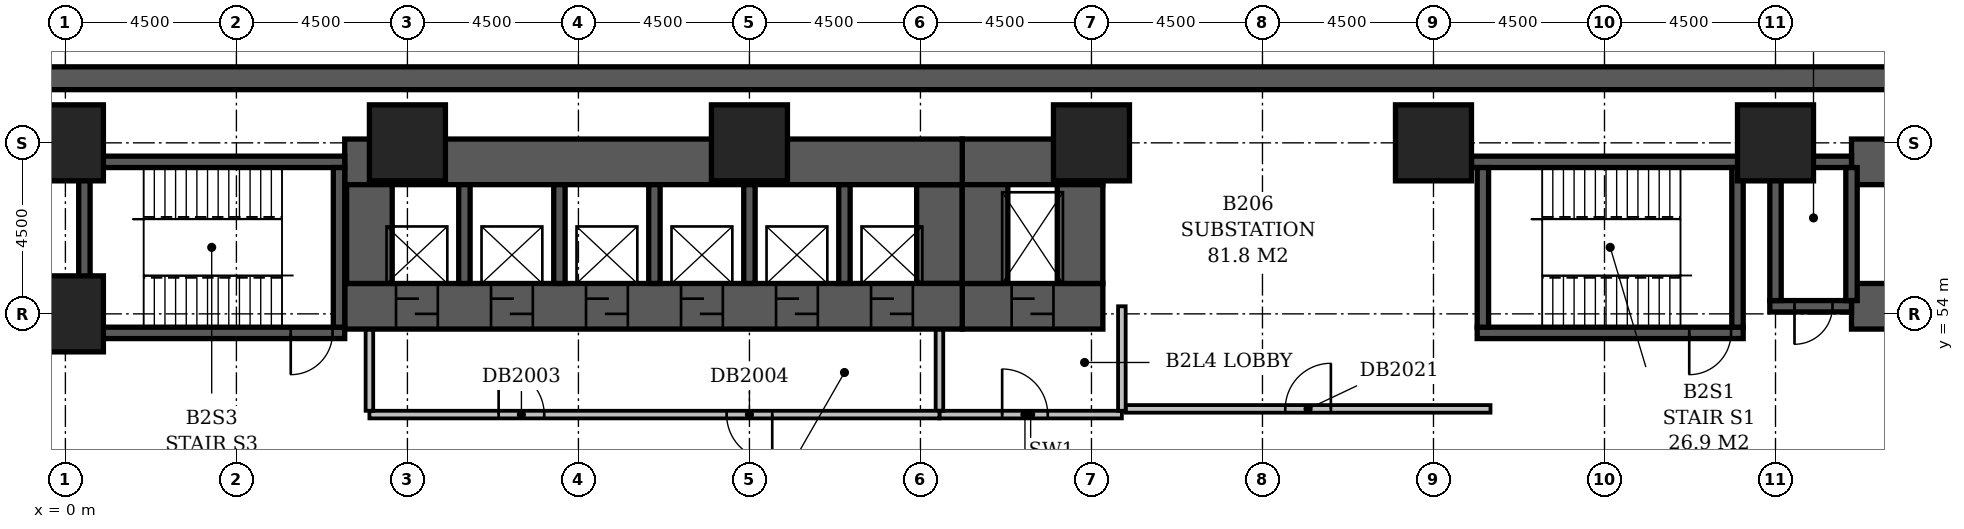
"""IFC4 building model, lengths in metres.
Left out: names, types, materials, properties, quantities, classifications, styles, units other than length and angle.
Written with IfcOpenShell. Run it as: python <this file> out.ifc"""

import sys

from ifc_helpers import new_model, si_unit, direction, frame, frame_2d, origin, origin_2d, place, context, subcontext, project, spatial, rectangle, extrude, element, fill, save


model = new_model("IFC4")
c1 = context("Model", 3, precision=1e-05, world=origin(), true_north=direction((0.0, 1.0)))
c2 = subcontext(c1, "Body", "Model", "MODEL_VIEW")
j1 = project(units=[si_unit("LENGTHUNIT", "METRE"), si_unit("PLANEANGLEUNIT", "RADIAN")], contexts=[c1])
p1 = place(None, origin())
s1 = spatial("IfcSite", under=j1, at=p1, CompositionType="ELEMENT")
p2 = place(p1, origin())
s2 = spatial("IfcBuilding", under=s1, at=p2, CompositionType="ELEMENT")
p3 = place(p2, frame((0.0, 0.0, -9.0)))
s3 = spatial("IfcBuildingStorey", under=s2, at=p3, CompositionType="ELEMENT", Elevation=-9.0)
for number, where, z_axis, x_axis in (
    (1, (0.0, 54.0, 0.0), (0.0, 0.0, 1.0), (1.0, 0.0, 0.0)),
    (2, (0.0, 58.5, 0.0), (0.0, 0.0, 1.0), (1.0, 0.0, 0.0)),
    (3, (9.0, 58.5, 0.0), (0.0, 0.0, 1.0), (1.0, 0.0, 0.0)),
    (4, (18.0, 58.5, 0.0), (0.0, 0.0, 1.0), (1.0, 0.0, 0.0)),
    (5, (27.0, 58.5, 0.0), (0.0, 0.0, 1.0), (1.0, 0.0, 0.0)),
    (6, (36.0, 58.5, 0.0), (0.0, 0.0, 1.0), (1.0, 0.0, 0.0)),
    (7, (45.0, 58.5, 0.0), (0.0, 0.0, 1.0), (1.0, 0.0, 0.0)),
):
    element("IfcColumn", number, at=place(p3, frame(where, z_axis=z_axis, x_axis=x_axis)), inside=s3, PredefinedType="COLUMN", context=c2, shape_type="SweptSolid", body=[
        extrude(rectangle(XDim=2.0, YDim=2.0, at=origin_2d()), origin(), (0.0, 0.0, 1.0), 4.1),
    ])
p4 = place(p3, frame((-2.0, 60.2, 0.0), z_axis=(0.0, 0.0, 1.0), x_axis=(1.0, 0.0, 0.0)))
e8 = element("IfcWall", 8, at=p4, inside=s3, PredefinedType="SOLIDWALL", context=c2, shape_type="SweptSolid", body=[
    extrude(rectangle(XDim=71.5, YDim=0.6, at=frame_2d((35.75, 0.0))), origin(), (0.0, 0.0, 1.0), 4.1),
])
p5 = place(p3, frame((0.35, 53.5, 0.0), z_axis=(0.0, 0.0, 1.0), x_axis=(1.0, 0.0, 0.0)))
e9 = element("IfcWall", 9, at=p5, inside=s3, PredefinedType="SHEAR", context=c2, shape_type="SweptSolid", body=[
    extrude(rectangle(XDim=7.0, YDim=0.3, at=frame_2d((3.5, 0.0))), origin(), (0.0, 0.0, 1.0), 4.1),
])
p6 = place(p5, frame((5.58, 0.0, 0.0)))
e10 = element("IfcOpeningElement", 10, at=p6, cuts=e9, PredefinedType="OPENING", context=c2, shape_type="SweptSolid", body=[
    extrude(rectangle(XDim=1.1, YDim=2.1, at=frame_2d((0.55, 1.05))), frame((0.0, 0.162, 0.0), z_axis=(0.0, -1.0, 0.0), x_axis=(1.0, 0.0, 0.0)), (0.0, 0.0, 1.0), 0.324),
])
p7 = place(p3, frame((37.15, 53.5, 0.0), z_axis=(0.0, 0.0, 1.0), x_axis=(1.0, 0.0, 0.0)))
e11 = element("IfcWall", 11, at=p7, inside=s3, PredefinedType="SHEAR", context=c2, shape_type="SweptSolid", body=[
    extrude(rectangle(XDim=7.0, YDim=0.3, at=frame_2d((3.5, 0.0))), origin(), (0.0, 0.0, 1.0), 4.1),
])
p8 = place(p7, frame((5.58, 0.0, 0.0)))
e12 = element("IfcOpeningElement", 12, at=p8, cuts=e11, PredefinedType="OPENING", context=c2, shape_type="SweptSolid", body=[
    extrude(rectangle(XDim=1.1, YDim=2.1, at=frame_2d((0.55, 1.05))), frame((0.0, 0.162, 0.0), z_axis=(0.0, -1.0, 0.0), x_axis=(1.0, 0.0, 0.0)), (0.0, 0.0, 1.0), 0.324),
])
p9 = place(p3, frame((7.35, 54.2, 0.0), z_axis=(0.0, 0.0, 1.0), x_axis=(1.0, 0.0, 0.0)))
e13 = element("IfcWall", 13, at=p9, inside=s3, PredefinedType="SHEAR", context=c2, shape_type="SweptSolid", body=[
    extrude(rectangle(XDim=16.25, YDim=1.2, at=frame_2d((8.125, 0.0))), origin(), (0.0, 0.0, 1.0), 4.1),
])
p10 = place(p9, frame((1.35, 0.0, 0.0)))
e14 = element("IfcOpeningElement", 14, at=p10, cuts=e13, PredefinedType="OPENING", context=c2, shape_type="SweptSolid", body=[
    extrude(rectangle(XDim=1.1, YDim=2.1, at=frame_2d((0.55, 1.05))), frame((0.0, 0.612, 0.0), z_axis=(0.0, -1.0, 0.0), x_axis=(1.0, 0.0, 0.0)), (0.0, 0.0, 1.0), 1.224),
])
p11 = place(p9, frame((3.85, 0.0, 0.0)))
e15 = element("IfcOpeningElement", 15, at=p11, cuts=e13, PredefinedType="OPENING", context=c2, shape_type="SweptSolid", body=[
    extrude(rectangle(XDim=1.1, YDim=2.1, at=frame_2d((0.55, 1.05))), frame((0.0, 0.612, 0.0), z_axis=(0.0, -1.0, 0.0), x_axis=(1.0, 0.0, 0.0)), (0.0, 0.0, 1.0), 1.224),
])
p12 = place(p9, frame((6.35, 0.0, 0.0)))
e16 = element("IfcOpeningElement", 16, at=p12, cuts=e13, PredefinedType="OPENING", context=c2, shape_type="SweptSolid", body=[
    extrude(rectangle(XDim=1.1, YDim=2.1, at=frame_2d((0.55, 1.05))), frame((0.0, 0.612, 0.0), z_axis=(0.0, -1.0, 0.0), x_axis=(1.0, 0.0, 0.0)), (0.0, 0.0, 1.0), 1.224),
])
p13 = place(p9, frame((8.85, 0.0, 0.0)))
e17 = element("IfcOpeningElement", 17, at=p13, cuts=e13, PredefinedType="OPENING", context=c2, shape_type="SweptSolid", body=[
    extrude(rectangle(XDim=1.1, YDim=2.1, at=frame_2d((0.55, 1.05))), frame((0.0, 0.612, 0.0), z_axis=(0.0, -1.0, 0.0), x_axis=(1.0, 0.0, 0.0)), (0.0, 0.0, 1.0), 1.224),
])
p14 = place(p9, frame((11.35, 0.0, 0.0)))
e18 = element("IfcOpeningElement", 18, at=p14, cuts=e13, PredefinedType="OPENING", context=c2, shape_type="SweptSolid", body=[
    extrude(rectangle(XDim=1.1, YDim=2.1, at=frame_2d((0.55, 1.05))), frame((0.0, 0.612, 0.0), z_axis=(0.0, -1.0, 0.0), x_axis=(1.0, 0.0, 0.0)), (0.0, 0.0, 1.0), 1.224),
])
p15 = place(p9, frame((13.85, 0.0, 0.0)))
e19 = element("IfcOpeningElement", 19, at=p15, cuts=e13, PredefinedType="OPENING", context=c2, shape_type="SweptSolid", body=[
    extrude(rectangle(XDim=1.1, YDim=2.1, at=frame_2d((0.55, 1.05))), frame((0.0, 0.612, 0.0), z_axis=(0.0, -1.0, 0.0), x_axis=(1.0, 0.0, 0.0)), (0.0, 0.0, 1.0), 1.224),
])
p16 = place(p3, frame((23.6, 54.2, 0.0), z_axis=(0.0, 0.0, 1.0), x_axis=(1.0, 0.0, 0.0)))
e20 = element("IfcWall", 20, at=p16, inside=s3, PredefinedType="SHEAR", context=c2, shape_type="SweptSolid", body=[
    extrude(rectangle(XDim=3.7, YDim=1.2, at=frame_2d((1.85, 0.0))), origin(), (0.0, 0.0, 1.0), 4.1),
])
p17 = place(p16, frame((1.3, 0.0, 0.0)))
e21 = element("IfcOpeningElement", 21, at=p17, cuts=e20, PredefinedType="OPENING", context=c2, shape_type="SweptSolid", body=[
    extrude(rectangle(XDim=1.1, YDim=2.1, at=frame_2d((0.55, 1.05))), frame((0.0, 0.612, 0.0), z_axis=(0.0, -1.0, 0.0), x_axis=(1.0, 0.0, 0.0)), (0.0, 0.0, 1.0), 1.224),
])
p18 = place(p3, frame((44.85, 54.2, 0.0), z_axis=(0.0, 0.0, 1.0), x_axis=(1.0, 0.0, 0.0)))
e22 = element("IfcWall", 22, at=p18, inside=s3, PredefinedType="SHEAR", context=c2, shape_type="SweptSolid", body=[
    extrude(rectangle(XDim=2.15, YDim=0.3, at=frame_2d((1.075, 0.0))), origin(), (0.0, 0.0, 1.0), 4.1),
])
p19 = place(p18, frame((0.65, 0.0, 0.0)))
e23 = element("IfcOpeningElement", 23, at=p19, cuts=e22, PredefinedType="OPENING", context=c2, shape_type="SweptSolid", body=[
    extrude(rectangle(XDim=1.0, YDim=2.1, at=frame_2d((0.5, 1.05))), frame((0.0, 0.162, 0.0), z_axis=(0.0, -1.0, 0.0), x_axis=(1.0, 0.0, 0.0)), (0.0, 0.0, 1.0), 0.324),
])
p20 = place(p3, frame((47.0, 54.2, 0.0), z_axis=(0.0, 0.0, 1.0), x_axis=(1.0, 0.0, 0.0)))
e24 = element("IfcWall", 24, at=p20, inside=s3, PredefinedType="SHEAR", context=c2, shape_type="SweptSolid", body=[
    extrude(rectangle(XDim=5.6, YDim=1.2, at=frame_2d((2.8, 0.0))), origin(), (0.0, 0.0, 1.0), 4.1),
])
p21 = place(p3, frame((0.35, 58.0, 0.0), z_axis=(0.0, 0.0, 1.0), x_axis=(1.0, 0.0, 0.0)))
e25 = element("IfcWall", 25, at=p21, inside=s3, PredefinedType="SHEAR", context=c2, shape_type="SweptSolid", body=[
    extrude(rectangle(XDim=7.0, YDim=0.3, at=frame_2d((3.5, 0.0))), origin(), (0.0, 0.0, 1.0), 4.1),
])
p22 = place(p3, frame((7.35, 58.0, 0.0), z_axis=(0.0, 0.0, 1.0), x_axis=(1.0, 0.0, 0.0)))
e26 = element("IfcWall", 26, at=p22, inside=s3, PredefinedType="SHEAR", context=c2, shape_type="SweptSolid", body=[
    extrude(rectangle(XDim=16.25, YDim=1.2, at=frame_2d((8.125, 0.0))), origin(), (0.0, 0.0, 1.0), 4.1),
])
p23 = place(p3, frame((23.6, 58.0, 0.0), z_axis=(0.0, 0.0, 1.0), x_axis=(1.0, 0.0, 0.0)))
e27 = element("IfcWall", 27, at=p23, inside=s3, PredefinedType="SHEAR", context=c2, shape_type="SweptSolid", body=[
    extrude(rectangle(XDim=3.7, YDim=1.2, at=frame_2d((1.85, 0.0))), origin(), (0.0, 0.0, 1.0), 4.1),
])
p24 = place(p3, frame((37.0, 58.0, 0.0), z_axis=(0.0, 0.0, 1.0), x_axis=(1.0, 0.0, 0.0)))
e28 = element("IfcWall", 28, at=p24, inside=s3, PredefinedType="SHEAR", context=c2, shape_type="SweptSolid", body=[
    extrude(rectangle(XDim=7.15, YDim=0.3, at=frame_2d((3.575, 0.0))), origin(), (0.0, 0.0, 1.0), 4.1),
])
p25 = place(p3, frame((44.85, 58.0, 0.0), z_axis=(0.0, 0.0, 1.0), x_axis=(1.0, 0.0, 0.0)))
e29 = element("IfcWall", 29, at=p25, inside=s3, PredefinedType="SHEAR", context=c2, shape_type="SweptSolid", body=[
    extrude(rectangle(XDim=2.15, YDim=0.3, at=frame_2d((1.075, 0.0))), origin(), (0.0, 0.0, 1.0), 4.1),
])
p26 = place(p3, frame((47.0, 58.0, 0.0), z_axis=(0.0, 0.0, 1.0), x_axis=(1.0, 0.0, 0.0)))
e30 = element("IfcWall", 30, at=p26, inside=s3, PredefinedType="SHEAR", context=c2, shape_type="SweptSolid", body=[
    extrude(rectangle(XDim=6.0, YDim=1.2, at=frame_2d((3.0, 0.0))), origin(), (0.0, 0.0, 1.0), 4.1),
])
for number, where, z_axis, x_axis in (
    (31, (0.5, 53.65, 0.0), (0.0, 0.0, 1.0), (0.0, 1.0, 0.0)),
    (32, (7.2, 53.65, 0.0), (0.0, 0.0, 1.0), (0.0, 1.0, 0.0)),
):
    element("IfcWall", number, at=place(p3, frame(where, z_axis=z_axis, x_axis=x_axis)), inside=s3, PredefinedType="SHEAR", context=c2, shape_type="SweptSolid", body=[
        extrude(rectangle(XDim=4.2, YDim=0.3, at=frame_2d((2.1, 0.0))), origin(), (0.0, 0.0, 1.0), 4.1),
    ])
p27 = place(p3, frame((8.0, 54.8, 0.0), z_axis=(0.0, 0.0, 1.0), x_axis=(0.0, 1.0, 0.0)))
e33 = element("IfcWall", 33, at=p27, inside=s3, PredefinedType="SHEAR", context=c2, shape_type="SweptSolid", body=[
    extrude(rectangle(XDim=2.6, YDim=1.2, at=frame_2d((1.3, 0.0))), origin(), (0.0, 0.0, 1.0), 4.1),
])
for number, where, z_axis, x_axis in (
    (34, (10.5, 54.8, 0.0), (0.0, 0.0, 1.0), (0.0, 1.0, 0.0)),
    (35, (13.0, 54.8, 0.0), (0.0, 0.0, 1.0), (0.0, 1.0, 0.0)),
    (36, (15.5, 54.8, 0.0), (0.0, 0.0, 1.0), (0.0, 1.0, 0.0)),
    (37, (18.0, 54.8, 0.0), (0.0, 0.0, 1.0), (0.0, 1.0, 0.0)),
    (38, (20.5, 54.8, 0.0), (0.0, 0.0, 1.0), (0.0, 1.0, 0.0)),
):
    element("IfcWall", number, at=place(p3, frame(where, z_axis=z_axis, x_axis=x_axis)), inside=s3, PredefinedType="SHEAR", context=c2, shape_type="SweptSolid", body=[
        extrude(rectangle(XDim=2.6, YDim=0.3, at=frame_2d((1.3, 0.0))), origin(), (0.0, 0.0, 1.0), 4.1),
    ])
for number, where, z_axis, x_axis in (
    (39, (23.0, 54.8, 0.0), (0.0, 0.0, 1.0), (0.0, 1.0, 0.0)),
    (40, (24.2, 54.8, 0.0), (0.0, 0.0, 1.0), (0.0, 1.0, 0.0)),
    (41, (26.7, 54.8, 0.0), (0.0, 0.0, 1.0), (0.0, 1.0, 0.0)),
):
    element("IfcWall", number, at=place(p3, frame(where, z_axis=z_axis, x_axis=x_axis)), inside=s3, PredefinedType="SHEAR", context=c2, shape_type="SweptSolid", body=[
        extrude(rectangle(XDim=2.6, YDim=1.2, at=frame_2d((1.3, 0.0))), origin(), (0.0, 0.0, 1.0), 4.1),
    ])
for number, where, z_axis, x_axis in (
    (42, (37.3, 53.65, 0.0), (0.0, 0.0, 1.0), (0.0, 1.0, 0.0)),
    (43, (44.0, 53.65, 0.0), (0.0, 0.0, 1.0), (0.0, 1.0, 0.0)),
):
    element("IfcWall", number, at=place(p3, frame(where, z_axis=z_axis, x_axis=x_axis)), inside=s3, PredefinedType="SHEAR", context=c2, shape_type="SweptSolid", body=[
        extrude(rectangle(XDim=4.2, YDim=0.3, at=frame_2d((2.1, 0.0))), origin(), (0.0, 0.0, 1.0), 4.1),
    ])
for number, where, z_axis, x_axis in (
    (44, (45.0, 54.35, 0.0), (0.0, 0.0, 1.0), (0.0, 1.0, 0.0)),
    (45, (47.0, 54.35, 0.0), (0.0, 0.0, 1.0), (0.0, 1.0, 0.0)),
):
    element("IfcWall", number, at=place(p3, frame(where, z_axis=z_axis, x_axis=x_axis)), inside=s3, PredefinedType="SHEAR", context=c2, shape_type="SweptSolid", body=[
        extrude(rectangle(XDim=3.5, YDim=0.3, at=frame_2d((1.75, 0.0))), origin(), (0.0, 0.0, 1.0), 4.1),
    ])
p28 = place(p3, frame((8.0, 51.35, 0.0), z_axis=(0.0, 0.0, 1.0), x_axis=(1.0, 0.0, 0.0)))
e46 = element("IfcWall", 46, at=p28, inside=s3, PredefinedType="PARTITIONING", context=c2, shape_type="SweptSolid", body=[
    extrude(rectangle(XDim=15.0, YDim=0.2, at=frame_2d((7.5, 0.0))), origin(), (0.0, 0.0, 1.0), 4.1),
])
p29 = place(p28, frame((3.4, 0.0, 0.0)))
e47 = element("IfcOpeningElement", 47, at=p29, cuts=e46, PredefinedType="OPENING", context=c2, shape_type="SweptSolid", body=[
    extrude(rectangle(XDim=1.2, YDim=2.1, at=frame_2d((0.6, 1.05))), frame((0.0, 0.112, 0.0), z_axis=(0.0, -1.0, 0.0), x_axis=(1.0, 0.0, 0.0)), (0.0, 0.0, 1.0), 0.224),
])
p30 = place(p28, frame((9.4, 0.0, 0.0)))
e48 = element("IfcOpeningElement", 48, at=p30, cuts=e46, PredefinedType="OPENING", context=c2, shape_type="SweptSolid", body=[
    extrude(rectangle(XDim=1.2, YDim=2.1, at=frame_2d((0.6, 1.05))), frame((0.0, 0.112, 0.0), z_axis=(0.0, -1.0, 0.0), x_axis=(1.0, 0.0, 0.0)), (0.0, 0.0, 1.0), 0.224),
])
for number, where, z_axis, x_axis in (
    (49, (23.0, 51.45, 0.0), (0.0, 0.0, 1.0), (0.0, 1.0, 0.0)),
    (50, (8.0, 51.45, 0.0), (0.0, 0.0, 1.0), (0.0, 1.0, 0.0)),
):
    element("IfcWall", number, at=place(p3, frame(where, z_axis=z_axis, x_axis=x_axis)), inside=s3, PredefinedType="PARTITIONING", context=c2, shape_type="SweptSolid", body=[
        extrude(rectangle(XDim=2.13, YDim=0.2, at=frame_2d((1.065, 0.0))), origin(), (0.0, 0.0, 1.0), 4.1),
    ])
p31 = place(p3, frame((23.0, 51.35, 0.0), z_axis=(0.0, 0.0, 1.0), x_axis=(1.0, 0.0, 0.0)))
e51 = element("IfcWall", 51, at=p31, inside=s3, PredefinedType="PARTITIONING", context=c2, shape_type="SweptSolid", body=[
    extrude(rectangle(XDim=4.8, YDim=0.2, at=frame_2d((2.4, 0.0))), origin(), (0.0, 0.0, 1.0), 4.1),
])
p32 = place(p31, frame((1.65, 0.0, 0.0)))
e52 = element("IfcOpeningElement", 52, at=p32, cuts=e51, PredefinedType="OPENING", context=c2, shape_type="SweptSolid", body=[
    extrude(rectangle(XDim=1.2, YDim=2.1, at=frame_2d((0.6, 1.05))), frame((0.0, 0.112, 0.0), z_axis=(0.0, -1.0, 0.0), x_axis=(1.0, 0.0, 0.0)), (0.0, 0.0, 1.0), 0.224),
])
p33 = place(p3, frame((27.8, 51.45, 0.0), z_axis=(0.0, 0.0, 1.0), x_axis=(0.0, 1.0, 0.0)))
e53 = element("IfcWall", 53, at=p33, inside=s3, PredefinedType="PARTITIONING", context=c2, shape_type="SweptSolid", body=[
    extrude(rectangle(XDim=2.75, YDim=0.2, at=frame_2d((1.375, 0.0))), origin(), (0.0, 0.0, 1.0), 4.1),
])
p34 = place(p3, frame((37.5, 51.5, 0.0), z_axis=(0.0, 0.0, 1.0), x_axis=(-1.0, 0.0, 0.0)))
e54 = element("IfcWall", 54, at=p34, inside=s3, PredefinedType="PARTITIONING", context=c2, shape_type="SweptSolid", body=[
    extrude(rectangle(XDim=9.6, YDim=0.2, at=frame_2d((4.8, 0.0))), origin(), (0.0, 0.0, 1.0), 4.1),
])
p35 = place(p34, frame((4.2, 0.0, 0.0)))
e55 = element("IfcOpeningElement", 55, at=p35, cuts=e54, PredefinedType="OPENING", context=c2, shape_type="SweptSolid", body=[
    extrude(rectangle(XDim=1.2, YDim=2.1, at=frame_2d((0.6, 1.05))), frame((0.0, 0.112, 0.0), z_axis=(0.0, -1.0, 0.0), x_axis=(1.0, 0.0, 0.0)), (0.0, 0.0, 1.0), 0.224),
])
p36 = place(p32, origin())
e56 = element("IfcDoor", 56, at=p36, inside=s3, OperationType="SINGLE_SWING_LEFT", PredefinedType="DOOR", context=c2, shape_type="SweptSolid", body=[
    extrude(rectangle(XDim=1.2, YDim=2.1, at=frame_2d((0.6, 1.05))), frame((0.0, 0.025, 0.0), z_axis=(0.0, -1.0, 0.0), x_axis=(1.0, 0.0, 0.0)), (0.0, 0.0, 1.0), 0.05),
])
fill(e52, e56)
p37 = place(p17, origin())
e57 = element("IfcDoor", 57, at=p37, inside=s3, OperationType="SLIDING_TO_LEFT", PredefinedType="DOOR", context=c2, shape_type="SweptSolid", body=[
    extrude(rectangle(XDim=1.1, YDim=2.1, at=frame_2d((0.55, 1.05))), frame((0.0, 0.025, 0.0), z_axis=(0.0, -1.0, 0.0), x_axis=(1.0, 0.0, 0.0)), (0.0, 0.0, 1.0), 0.05),
])
fill(e21, e57)
p38 = place(p10, origin())
e58 = element("IfcDoor", 58, at=p38, inside=s3, OperationType="SLIDING_TO_LEFT", PredefinedType="DOOR", context=c2, shape_type="SweptSolid", body=[
    extrude(rectangle(XDim=1.1, YDim=2.1, at=frame_2d((0.55, 1.05))), frame((0.0, 0.025, 0.0), z_axis=(0.0, -1.0, 0.0), x_axis=(1.0, 0.0, 0.0)), (0.0, 0.0, 1.0), 0.05),
])
fill(e14, e58)
p39 = place(p11, origin())
e59 = element("IfcDoor", 59, at=p39, inside=s3, OperationType="SLIDING_TO_LEFT", PredefinedType="DOOR", context=c2, shape_type="SweptSolid", body=[
    extrude(rectangle(XDim=1.1, YDim=2.1, at=frame_2d((0.55, 1.05))), frame((0.0, 0.025, 0.0), z_axis=(0.0, -1.0, 0.0), x_axis=(1.0, 0.0, 0.0)), (0.0, 0.0, 1.0), 0.05),
])
fill(e15, e59)
p40 = place(p12, origin())
e60 = element("IfcDoor", 60, at=p40, inside=s3, OperationType="SLIDING_TO_LEFT", PredefinedType="DOOR", context=c2, shape_type="SweptSolid", body=[
    extrude(rectangle(XDim=1.1, YDim=2.1, at=frame_2d((0.55, 1.05))), frame((0.0, 0.025, 0.0), z_axis=(0.0, -1.0, 0.0), x_axis=(1.0, 0.0, 0.0)), (0.0, 0.0, 1.0), 0.05),
])
fill(e16, e60)
p41 = place(p13, origin())
e61 = element("IfcDoor", 61, at=p41, inside=s3, OperationType="SLIDING_TO_LEFT", PredefinedType="DOOR", context=c2, shape_type="SweptSolid", body=[
    extrude(rectangle(XDim=1.1, YDim=2.1, at=frame_2d((0.55, 1.05))), frame((0.0, 0.025, 0.0), z_axis=(0.0, -1.0, 0.0), x_axis=(1.0, 0.0, 0.0)), (0.0, 0.0, 1.0), 0.05),
])
fill(e17, e61)
p42 = place(p14, origin())
e62 = element("IfcDoor", 62, at=p42, inside=s3, OperationType="SLIDING_TO_LEFT", PredefinedType="DOOR", context=c2, shape_type="SweptSolid", body=[
    extrude(rectangle(XDim=1.1, YDim=2.1, at=frame_2d((0.55, 1.05))), frame((0.0, 0.025, 0.0), z_axis=(0.0, -1.0, 0.0), x_axis=(1.0, 0.0, 0.0)), (0.0, 0.0, 1.0), 0.05),
])
fill(e18, e62)
p43 = place(p15, origin())
e63 = element("IfcDoor", 63, at=p43, inside=s3, OperationType="SLIDING_TO_LEFT", PredefinedType="DOOR", context=c2, shape_type="SweptSolid", body=[
    extrude(rectangle(XDim=1.1, YDim=2.1, at=frame_2d((0.55, 1.05))), frame((0.0, 0.025, 0.0), z_axis=(0.0, -1.0, 0.0), x_axis=(1.0, 0.0, 0.0)), (0.0, 0.0, 1.0), 0.05),
])
fill(e19, e63)
p44 = place(p29, origin())
e64 = element("IfcDoor", 64, at=p44, inside=s3, OperationType="SINGLE_SWING_LEFT", PredefinedType="DOOR", context=c2, shape_type="SweptSolid", body=[
    extrude(rectangle(XDim=1.2, YDim=2.1, at=frame_2d((0.6, 1.05))), frame((0.0, 0.025, 0.0), z_axis=(0.0, -1.0, 0.0), x_axis=(1.0, 0.0, 0.0)), (0.0, 0.0, 1.0), 0.05),
])
fill(e47, e64)
p45 = place(p30, origin())
e65 = element("IfcDoor", 65, at=p45, inside=s3, OperationType="SINGLE_SWING_RIGHT", PredefinedType="DOOR", context=c2, shape_type="SweptSolid", body=[
    extrude(rectangle(XDim=1.2, YDim=2.1, at=frame_2d((0.6, 1.05))), frame((0.0, 0.025, 0.0), z_axis=(0.0, -1.0, 0.0), x_axis=(1.0, 0.0, 0.0)), (0.0, 0.0, 1.0), 0.05),
])
fill(e48, e65)
p46 = place(p19, frame((1.0, 0.0, 0.0), z_axis=(0.0, 0.0, 1.0), x_axis=(-1.0, 0.0, 0.0)))
e66 = element("IfcDoor", 66, at=p46, inside=s3, OperationType="SINGLE_SWING_RIGHT", PredefinedType="DOOR", context=c2, shape_type="SweptSolid", body=[
    extrude(rectangle(XDim=1.0, YDim=2.1, at=frame_2d((0.5, 1.05))), frame((0.0, 0.025, 0.0), z_axis=(0.0, -1.0, 0.0), x_axis=(1.0, 0.0, 0.0)), (0.0, 0.0, 1.0), 0.05),
])
fill(e23, e66)
p47 = place(p8, frame((1.1, 0.0, 0.0), z_axis=(0.0, 0.0, 1.0), x_axis=(-1.0, 0.0, 0.0)))
e67 = element("IfcDoor", 67, at=p47, inside=s3, OperationType="SINGLE_SWING_RIGHT", PredefinedType="DOOR", context=c2, shape_type="SweptSolid", body=[
    extrude(rectangle(XDim=1.1, YDim=2.1, at=frame_2d((0.55, 1.05))), frame((0.0, 0.025, 0.0), z_axis=(0.0, -1.0, 0.0), x_axis=(1.0, 0.0, 0.0)), (0.0, 0.0, 1.0), 0.05),
])
fill(e12, e67)
p48 = place(p6, frame((1.1, 0.0, 0.0), z_axis=(0.0, 0.0, 1.0), x_axis=(-1.0, 0.0, 0.0)))
e68 = element("IfcDoor", 68, at=p48, inside=s3, OperationType="SINGLE_SWING_RIGHT", PredefinedType="DOOR", context=c2, shape_type="SweptSolid", body=[
    extrude(rectangle(XDim=1.1, YDim=2.1, at=frame_2d((0.55, 1.05))), frame((0.0, 0.025, 0.0), z_axis=(0.0, -1.0, 0.0), x_axis=(1.0, 0.0, 0.0)), (0.0, 0.0, 1.0), 0.05),
])
fill(e10, e68)
p49 = place(p35, frame((1.2, 0.0, 0.0), z_axis=(0.0, 0.0, 1.0), x_axis=(-1.0, 0.0, 0.0)))
e69 = element("IfcDoor", 69, at=p49, inside=s3, OperationType="SINGLE_SWING_RIGHT", PredefinedType="DOOR", context=c2, shape_type="SweptSolid", body=[
    extrude(rectangle(XDim=1.2, YDim=2.1, at=frame_2d((0.6, 1.05))), frame((0.0, 0.025, 0.0), z_axis=(0.0, -1.0, 0.0), x_axis=(1.0, 0.0, 0.0)), (0.0, 0.0, 1.0), 0.05),
])
fill(e55, e69)
save(model, sys.argv[1])
